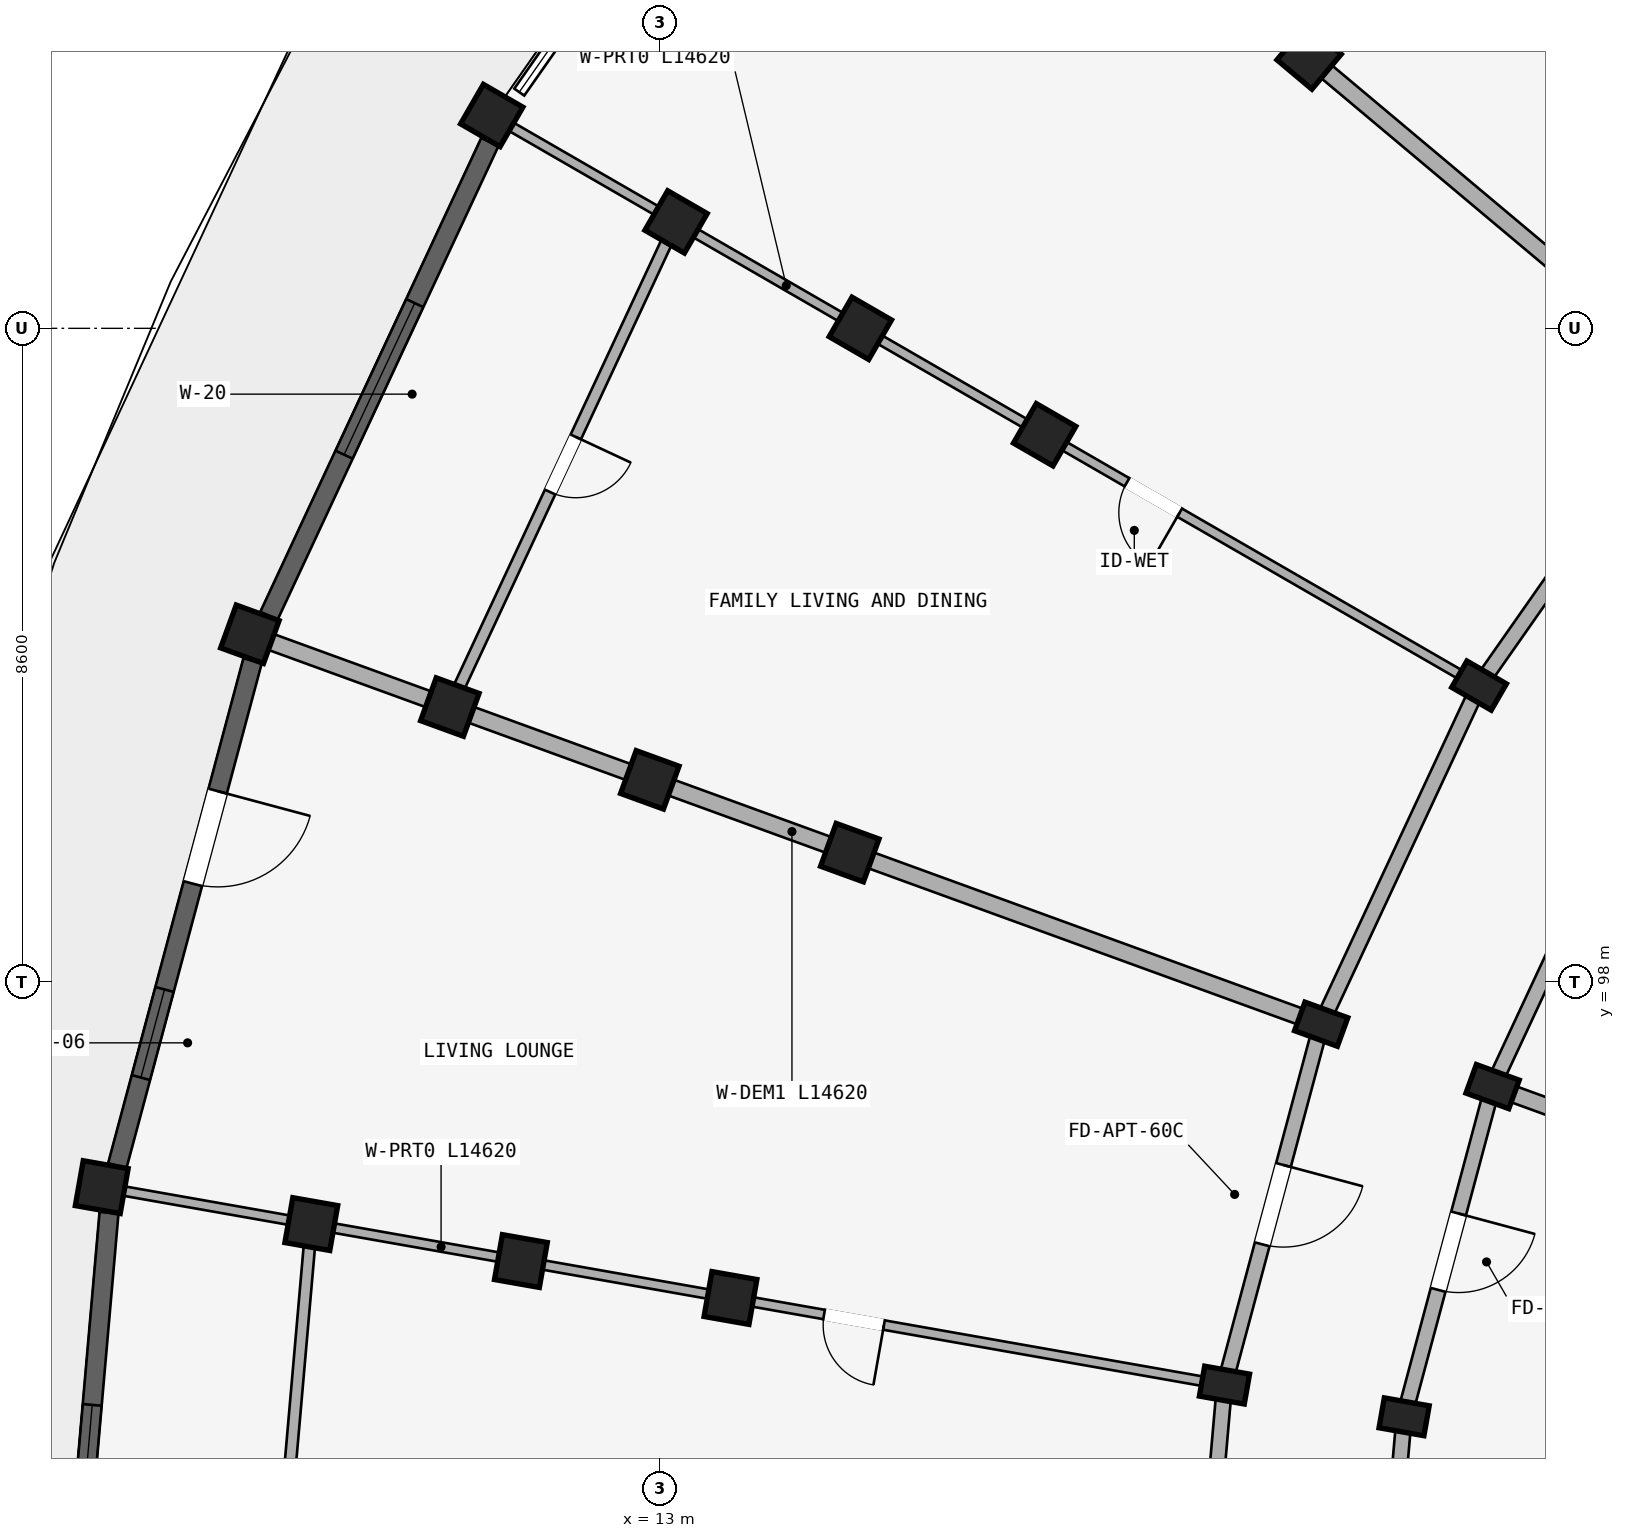
"""IFC4 building model, lengths in metres.
Left out: names, types, materials, properties, quantities, classifications, styles, units other than length and angle.
Written with IfcOpenShell. Run it as: python <this file> out.ifc"""

import sys

from ifc_helpers import new_model, si_unit, direction, frame, frame_2d, origin, origin_2d, place, context, subcontext, project, spatial, rectangle, extrude, element, fill, save


model = new_model("IFC4")
c1 = context("Model", 3, precision=1e-05, world=origin(), true_north=direction((0.0, 1.0)))
c2 = subcontext(c1, "Body", "Model", "MODEL_VIEW")
j1 = project(units=[si_unit("LENGTHUNIT", "METRE"), si_unit("PLANEANGLEUNIT", "RADIAN")], contexts=[c1])
p1 = place(None, origin())
s1 = spatial("IfcSite", under=j1, at=p1, CompositionType="ELEMENT")
p2 = place(p1, origin())
s2 = spatial("IfcBuilding", under=s1, at=p2, CompositionType="ELEMENT")
p3 = place(p2, frame((0.0, 0.0, 40.2)))
s3 = spatial("IfcBuildingStorey", under=s2, at=p3, CompositionType="ELEMENT", Elevation=40.2)
p4 = place(p3, frame((21.542, 110.169, 0.0), z_axis=(0.0, 0.0, 1.0), x_axis=(0.642787609687, 0.766044443119, 0.0)))
e1 = element("IfcColumn", 1, at=p4, inside=s3, PredefinedType="COLUMN", context=c2, shape_type="SweptSolid", body=[
    extrude(rectangle(XDim=0.6, YDim=0.6, at=origin_2d()), origin(), (0.0, 0.0, 1.0), 2.93),
])
p5 = place(p3, frame((23.778, 101.9, 0.0), z_axis=(0.0, 0.0, 1.0), x_axis=(0.5, 0.866025403784, 0.0)))
e2 = element("IfcColumn", 2, at=p5, inside=s3, PredefinedType="COLUMN", context=c2, shape_type="SweptSolid", body=[
    extrude(rectangle(XDim=0.4, YDim=0.6, at=origin_2d()), origin(), (0.0, 0.0, 1.0), 2.93),
])
for number, where, z_axis, x_axis in (
    (3, (18.062, 105.2, 0.0), (0.0, 0.0, 1.0), (0.5, 0.866, 0.0)),
    (4, (15.637, 106.6, 0.0), (0.0, 0.0, 1.0), (0.5, 0.866, 0.0)),
    (5, (13.213, 108.0, 0.0), (0.0, 0.0, 1.0), (0.5, 0.866, 0.0)),
):
    element("IfcColumn", number, at=place(p3, frame(where, z_axis=z_axis, x_axis=x_axis)), inside=s3, PredefinedType="COLUMN", context=c2, shape_type="SweptSolid", body=[
        extrude(rectangle(XDim=0.6, YDim=0.6, at=origin_2d()), origin(), (0.0, 0.0, 1.0), 2.93),
    ])
p6 = place(p3, frame((10.788, 109.4, 0.0), z_axis=(0.0, 0.0, 1.0), x_axis=(0.5, 0.866025403784, 0.0)))
e6 = element("IfcColumn", 6, at=p6, inside=s3, PredefinedType="COLUMN", context=c2, shape_type="SweptSolid", body=[
    extrude(rectangle(XDim=0.6, YDim=0.6, at=origin_2d()), origin(), (0.0, 0.0, 1.0), 2.97),
])
for number, where, z_axis, x_axis in (
    (7, (23.956, 96.624, 0.0), (0.0, 0.0, 1.0), (0.342, 0.94, 0.0)),
    (8, (21.701, 97.445, 0.0), (0.0, 0.0, 1.0), (0.342, 0.94, 0.0)),
):
    element("IfcColumn", number, at=place(p3, frame(where, z_axis=z_axis, x_axis=x_axis)), inside=s3, PredefinedType="COLUMN", context=c2, shape_type="SweptSolid", body=[
        extrude(rectangle(XDim=0.4, YDim=0.6, at=origin_2d()), origin(), (0.0, 0.0, 1.0), 2.93),
    ])
for number, where, z_axis, x_axis in (
    (9, (15.499, 99.702, 0.0), (0.0, 0.0, 1.0), (0.342, 0.94, 0.0)),
    (10, (12.868, 100.66, 0.0), (0.0, 0.0, 1.0), (0.342, 0.94, 0.0)),
    (11, (10.236, 101.618, 0.0), (0.0, 0.0, 1.0), (0.342, 0.94, 0.0)),
):
    element("IfcColumn", number, at=place(p3, frame(where, z_axis=z_axis, x_axis=x_axis)), inside=s3, PredefinedType="COLUMN", context=c2, shape_type="SweptSolid", body=[
        extrude(rectangle(XDim=0.6, YDim=0.6, at=origin_2d()), origin(), (0.0, 0.0, 1.0), 2.93),
    ])
p7 = place(p3, frame((7.605, 102.575, 0.0), z_axis=(0.0, 0.0, 1.0), x_axis=(0.342020143326, 0.939692620786, 0.0)))
e12 = element("IfcColumn", 12, at=p7, inside=s3, PredefinedType="COLUMN", context=c2, shape_type="SweptSolid", body=[
    extrude(rectangle(XDim=0.6, YDim=0.6, at=origin_2d()), origin(), (0.0, 0.0, 1.0), 2.97),
])
for number, where, z_axis, x_axis in (
    (13, (22.792, 92.28, 0.0), (0.0, 0.0, 1.0), (0.174, 0.985, 0.0)),
    (14, (20.428, 92.697, 0.0), (0.0, 0.0, 1.0), (0.174, 0.985, 0.0)),
):
    element("IfcColumn", number, at=place(p3, frame(where, z_axis=z_axis, x_axis=x_axis)), inside=s3, PredefinedType="COLUMN", context=c2, shape_type="SweptSolid", body=[
        extrude(rectangle(XDim=0.4, YDim=0.6, at=origin_2d()), origin(), (0.0, 0.0, 1.0), 2.93),
    ])
for number, where, z_axis, x_axis in (
    (15, (13.929, 93.843, 0.0), (0.0, 0.0, 1.0), (0.174, 0.985, 0.0)),
    (16, (11.171, 94.329, 0.0), (0.0, 0.0, 1.0), (0.174, 0.985, 0.0)),
    (17, (8.414, 94.815, 0.0), (0.0, 0.0, 1.0), (0.174, 0.985, 0.0)),
):
    element("IfcColumn", number, at=place(p3, frame(where, z_axis=z_axis, x_axis=x_axis)), inside=s3, PredefinedType="COLUMN", context=c2, shape_type="SweptSolid", body=[
        extrude(rectangle(XDim=0.6, YDim=0.6, at=origin_2d()), origin(), (0.0, 0.0, 1.0), 2.93),
    ])
p8 = place(p3, frame((5.656, 95.302, 0.0), z_axis=(0.0, 0.0, 1.0), x_axis=(0.173648177667, 0.984807753012, 0.0)))
e18 = element("IfcColumn", 18, at=p8, inside=s3, PredefinedType="COLUMN", context=c2, shape_type="SweptSolid", body=[
    extrude(rectangle(XDim=0.6, YDim=0.6, at=origin_2d()), origin(), (0.0, 0.0, 1.0), 2.97),
])
p9 = place(p3, frame((26.598, 105.927, 0.0), z_axis=(0.0, 0.0, 1.0), x_axis=(-0.573592335331, -0.819140911474, 0.0)))
e19 = element("IfcWall", 19, at=p9, inside=s3, PredefinedType="STANDARD", context=c2, shape_type="SweptSolid", body=[
    extrude(rectangle(XDim=4.916, YDim=0.2, at=frame_2d((2.458, 0.0))), origin(), (0.0, 0.0, 1.0), 2.372),
])
p10 = place(p9, frame((1.938, 0.0, 0.0)))
e20 = element("IfcOpeningElement", 20, at=p10, cuts=e19, PredefinedType="OPENING", context=c2, shape_type="SweptSolid", body=[
    extrude(rectangle(XDim=1.04, YDim=2.15, at=frame_2d((0.52, 1.075))), frame((0.0, 0.11, 0.0), z_axis=(0.0, -1.0, 0.0), x_axis=(1.0, 0.0, 0.0)), (0.0, 0.0, 1.0), 0.22),
])
p11 = place(p3, frame((25.856, 100.7, 0.0), z_axis=(0.0, 0.0, 1.0), x_axis=(-0.422617978463, -0.906307919131, 0.0)))
e21 = element("IfcWall", 21, at=p11, inside=s3, PredefinedType="STANDARD", context=c2, shape_type="SweptSolid", body=[
    extrude(rectangle(XDim=4.497, YDim=0.2, at=frame_2d((2.249, 0.0))), origin(), (0.0, 0.0, 1.0), 2.372),
])
p12 = place(p3, frame((23.778, 101.9, 0.0), z_axis=(0.0, 0.0, 1.0), x_axis=(-0.422629854778, -0.906302381024, 0.0)))
e22 = element("IfcWall", 22, at=p12, inside=s3, PredefinedType="STANDARD", context=c2, shape_type="SweptSolid", body=[
    extrude(rectangle(XDim=4.915, YDim=0.2, at=frame_2d((2.458, 0.0))), origin(), (0.0, 0.0, 1.0), 2.372),
])
p13 = place(p3, frame((23.956, 96.624, 0.0), z_axis=(0.0, 0.0, 1.0), x_axis=(-0.258787642463, -0.965934240054, 0.0)))
e23 = element("IfcWall", 23, at=p13, inside=s3, PredefinedType="STANDARD", context=c2, shape_type="SweptSolid", body=[
    extrude(rectangle(XDim=4.497, YDim=0.2, at=frame_2d((2.249, 0.0))), origin(), (0.0, 0.0, 1.0), 2.372),
])
p14 = place(p13, frame((1.729, 0.0, 0.0)))
e24 = element("IfcOpeningElement", 24, at=p14, cuts=e23, PredefinedType="OPENING", context=c2, shape_type="SweptSolid", body=[
    extrude(rectangle(XDim=1.04, YDim=2.15, at=frame_2d((0.52, 1.075))), frame((0.0, 0.11, 0.0), z_axis=(0.0, -1.0, 0.0), x_axis=(1.0, 0.0, 0.0)), (0.0, 0.0, 1.0), 0.22),
])
p15 = place(p3, frame((21.701, 97.445, 0.0), z_axis=(0.0, 0.0, 1.0), x_axis=(-0.258803112091, -0.965930095386, 0.0)))
e25 = element("IfcWall", 25, at=p15, inside=s3, PredefinedType="STANDARD", context=c2, shape_type="SweptSolid", body=[
    extrude(rectangle(XDim=4.916, YDim=0.2, at=frame_2d((2.458, 0.0))), origin(), (0.0, 0.0, 1.0), 2.372),
])
p16 = place(p15, frame((1.918, 0.0, 0.0)))
e26 = element("IfcOpeningElement", 26, at=p16, cuts=e25, PredefinedType="OPENING", context=c2, shape_type="SweptSolid", body=[
    extrude(rectangle(XDim=1.08, YDim=2.15, at=frame_2d((0.54, 1.075))), frame((0.0, 0.11, 0.0), z_axis=(0.0, -1.0, 0.0), x_axis=(1.0, 0.0, 0.0)), (0.0, 0.0, 1.0), 0.22),
])
p17 = place(p3, frame((22.792, 92.28, 0.0), z_axis=(0.0, 0.0, 1.0), x_axis=(-0.087187153726, -0.996191949488, 0.0)))
e27 = element("IfcWall", 27, at=p17, inside=s3, PredefinedType="STANDARD", context=c2, shape_type="SweptSolid", body=[
    extrude(rectangle(XDim=4.497, YDim=0.2, at=frame_2d((2.249, 0.0))), origin(), (0.0, 0.0, 1.0), 2.372),
])
p18 = place(p3, frame((20.428, 92.697, 0.0), z_axis=(0.0, 0.0, 1.0), x_axis=(-0.087167566415, -0.996193663584, 0.0)))
e28 = element("IfcWall", 28, at=p18, inside=s3, PredefinedType="STANDARD", context=c2, shape_type="SweptSolid", body=[
    extrude(rectangle(XDim=4.916, YDim=0.2, at=frame_2d((2.458, 0.0))), origin(), (0.0, 0.0, 1.0), 2.372),
])
p19 = place(p3, frame((30.009, 109.479, 0.0), z_axis=(0.0, 0.0, 1.0), x_axis=(-0.642779216656, 0.76605148563, 0.0)))
e29 = element("IfcWall", 29, at=p19, inside=s3, PredefinedType="PARTITIONING", context=c2, shape_type="SweptSolid", body=[
    extrude(rectangle(XDim=14.62, YDim=0.125, at=frame_2d((7.31, 0.0))), origin(), (0.0, 0.0, 1.0), 2.372),
])
p20 = place(p19, frame((4.449, 0.0, 0.0)))
e30 = element("IfcOpeningElement", 30, at=p20, cuts=e29, PredefinedType="OPENING", context=c2, shape_type="SweptSolid", body=[
    extrude(rectangle(XDim=0.8, YDim=2.1, at=frame_2d((0.4, 1.05))), frame((0.0, 0.073, 0.0), z_axis=(0.0, -1.0, 0.0), x_axis=(1.0, 0.0, 0.0)), (0.0, 0.0, 1.0), 0.145),
])
p21 = place(p3, frame((26.521, 105.991, 0.0), z_axis=(0.0, 0.0, 1.0), x_axis=(-0.76605148563, 0.642779216656, 0.0)))
e31 = element("IfcWall", 31, at=p21, inside=s3, PredefinedType="STANDARD", context=c2, shape_type="SweptSolid", body=[
    extrude(rectangle(XDim=14.62, YDim=0.22, at=frame_2d((7.31, 0.0))), origin(), (0.0, 0.0, 1.0), 2.372),
])
p22 = place(p3, frame((23.691, 101.95, 0.0), z_axis=(0.0, 0.0, 1.0), x_axis=(-0.866020956416, 0.500007702989, 0.0)))
e32 = element("IfcWall", 32, at=p22, inside=s3, PredefinedType="PARTITIONING", context=c2, shape_type="SweptSolid", body=[
    extrude(rectangle(XDim=14.62, YDim=0.125, at=frame_2d((7.31, 0.0))), origin(), (0.0, 0.0, 1.0), 2.372),
])
p23 = place(p22, frame((4.449, 0.0, 0.0)))
e33 = element("IfcOpeningElement", 33, at=p23, cuts=e32, PredefinedType="OPENING", context=c2, shape_type="SweptSolid", body=[
    extrude(rectangle(XDim=0.8, YDim=2.1, at=frame_2d((0.4, 1.05))), frame((0.0, 0.073, 0.0), z_axis=(0.0, -1.0, 0.0), x_axis=(1.0, 0.0, 0.0)), (0.0, 0.0, 1.0), 0.145),
])
p24 = place(p3, frame((30.346, 94.298, 0.0), z_axis=(0.0, 0.0, 1.0), x_axis=(-0.939696231917, 0.342010221662, 0.0)))
e34 = element("IfcWall", 34, at=p24, inside=s3, PredefinedType="STANDARD", context=c2, shape_type="SweptSolid", body=[
    extrude(rectangle(XDim=6.75, YDim=0.22, at=frame_2d((3.375, 0.0))), origin(), (0.0, 0.0, 1.0), 2.372),
])
p25 = place(p3, frame((21.607, 97.479, 0.0), z_axis=(0.0, 0.0, 1.0), x_axis=(-0.939694408106, 0.342015232663, 0.0)))
e35 = element("IfcWall", 35, at=p25, inside=s3, PredefinedType="STANDARD", context=c2, shape_type="SweptSolid", body=[
    extrude(rectangle(XDim=14.62, YDim=0.22, at=frame_2d((7.31, 0.0))), origin(), (0.0, 0.0, 1.0), 2.372),
])
p26 = place(p3, frame((20.33, 92.714, 0.0), z_axis=(0.0, 0.0, 1.0), x_axis=(-0.984809269474, 0.173639577162, 0.0)))
e36 = element("IfcWall", 36, at=p26, inside=s3, PredefinedType="PARTITIONING", context=c2, shape_type="SweptSolid", body=[
    extrude(rectangle(XDim=14.62, YDim=0.125, at=frame_2d((7.31, 0.0))), origin(), (0.0, 0.0, 1.0), 2.372),
])
p27 = place(p26, frame((4.449, 0.0, 0.0)))
e37 = element("IfcOpeningElement", 37, at=p27, cuts=e36, PredefinedType="OPENING", context=c2, shape_type="SweptSolid", body=[
    extrude(rectangle(XDim=0.8, YDim=2.1, at=frame_2d((0.4, 1.05))), frame((0.0, 0.073, 0.0), z_axis=(0.0, -1.0, 0.0), x_axis=(1.0, 0.0, 0.0)), (0.0, 0.0, 1.0), 0.145),
])
p28 = place(p3, frame((13.213, 108.0, 0.0), z_axis=(0.0, 0.0, 1.0), x_axis=(-0.422640621205, -0.906297360311, 0.0)))
e38 = element("IfcWall", 38, at=p28, inside=s3, PredefinedType="PLUMBINGWALL", context=c2, shape_type="SweptSolid", body=[
    extrude(rectangle(XDim=7.042, YDim=0.15, at=frame_2d((3.521, 0.0))), origin(), (0.0, 0.0, 1.0), 2.372),
])
p29 = place(p28, frame((3.121, 0.0, 0.0)))
e39 = element("IfcOpeningElement", 39, at=p29, cuts=e38, PredefinedType="OPENING", context=c2, shape_type="SweptSolid", body=[
    extrude(rectangle(XDim=0.8, YDim=2.1, at=frame_2d((0.4, 1.05))), frame((0.0, 0.085, 0.0), z_axis=(0.0, -1.0, 0.0), x_axis=(1.0, 0.0, 0.0)), (0.0, 0.0, 1.0), 0.17),
])
p30 = place(p3, frame((8.414, 94.815, 0.0), z_axis=(0.0, 0.0, 1.0), x_axis=(-0.087156198737, -0.996194658198, 0.0)))
e40 = element("IfcWall", 40, at=p30, inside=s3, PredefinedType="PLUMBINGWALL", context=c2, shape_type="SweptSolid", body=[
    extrude(rectangle(XDim=7.042, YDim=0.15, at=frame_2d((3.521, 0.0))), origin(), (0.0, 0.0, 1.0), 2.372),
])
p31 = place(p30, frame((3.141, 0.0, 0.0)))
e41 = element("IfcOpeningElement", 41, at=p31, cuts=e40, PredefinedType="OPENING", context=c2, shape_type="SweptSolid", body=[
    extrude(rectangle(XDim=0.76, YDim=2.05, at=frame_2d((0.38, 1.025))), frame((0.0, 0.085, 0.0), z_axis=(0.0, -1.0, 0.0), x_axis=(1.0, 0.0, 0.0)), (0.0, 0.0, 1.0), 0.17),
])
p32 = place(p3, frame((10.763, 109.052, 0.0), z_axis=(0.0, 0.0, 1.0), x_axis=(-0.422628979279, -0.906302789289, 0.0)))
e42 = element("IfcWall", 42, at=p32, inside=s3, PredefinedType="STANDARD", context=c2, shape_type="SweptSolid", body=[
    extrude(rectangle(XDim=6.879, YDim=0.25, at=frame_2d((3.439, 0.0))), origin(), (0.0, 0.0, 1.0), 2.48),
])
p33 = place(p32, frame((2.34, 0.0, 0.38)))
e43 = element("IfcOpeningElement", 43, at=p33, cuts=e42, PredefinedType="OPENING", context=c2, shape_type="SweptSolid", body=[
    extrude(rectangle(XDim=2.2, YDim=1.9, at=frame_2d((1.1, 0.95))), frame((0.0, 0.135, 0.0), z_axis=(0.0, -1.0, 0.0), x_axis=(1.0, 0.0, 0.0)), (0.0, 0.0, 1.0), 0.27),
])
p34 = place(p3, frame((7.642, 102.228, 0.0), z_axis=(0.0, 0.0, 1.0), x_axis=(-0.258835428922, -0.965921436109, 0.0)))
e44 = element("IfcWall", 44, at=p34, inside=s3, PredefinedType="STANDARD", context=c2, shape_type="SweptSolid", body=[
    extrude(rectangle(XDim=6.879, YDim=0.25, at=frame_2d((3.439, 0.0))), origin(), (0.0, 0.0, 1.0), 2.48),
])
p35 = place(p34, frame((4.479, 0.0, 0.53)))
e45 = element("IfcOpeningElement", 45, at=p35, cuts=e44, PredefinedType="OPENING", context=c2, shape_type="SweptSolid", body=[
    extrude(rectangle(XDim=1.2, YDim=1.5, at=frame_2d((0.6, 0.75))), frame((0.0, 0.135, 0.0), z_axis=(0.0, -1.0, 0.0), x_axis=(1.0, 0.0, 0.0)), (0.0, 0.0, 1.0), 0.27),
])
p36 = place(p34, frame((1.778, 0.0, 0.0)))
e46 = element("IfcOpeningElement", 46, at=p36, cuts=e44, PredefinedType="OPENING", context=c2, shape_type="SweptSolid", body=[
    extrude(rectangle(XDim=1.26, YDim=2.15, at=frame_2d((0.63, 1.075))), frame((0.0, 0.135, 0.0), z_axis=(0.0, -1.0, 0.0), x_axis=(1.0, 0.0, 0.0)), (0.0, 0.0, 1.0), 0.27),
])
p37 = place(p3, frame((5.752, 94.966, 0.0), z_axis=(0.0, 0.0, 1.0), x_axis=(-0.087165629485, -0.996193833065, 0.0)))
e47 = element("IfcWall", 47, at=p37, inside=s3, PredefinedType="STANDARD", context=c2, shape_type="SweptSolid", body=[
    extrude(rectangle(XDim=6.879, YDim=0.25, at=frame_2d((3.439, 0.0))), origin(), (0.0, 0.0, 1.0), 2.48),
])
p38 = place(p37, frame((2.54, 0.0, 0.63)))
e48 = element("IfcOpeningElement", 48, at=p38, cuts=e47, PredefinedType="OPENING", context=c2, shape_type="SweptSolid", body=[
    extrude(rectangle(XDim=1.8, YDim=1.65, at=frame_2d((0.9, 0.825))), frame((0.0, 0.135, 0.0), z_axis=(0.0, -1.0, 0.0), x_axis=(1.0, 0.0, 0.0)), (0.0, 0.0, 1.0), 0.27),
])
p39 = place(p33, origin())
e49 = element("IfcWindow", 49, at=p39, inside=s3, PartitioningType="TRIPLE_PANEL_VERTICAL", PredefinedType="WINDOW", context=c2, shape_type="SweptSolid", body=[
    extrude(rectangle(XDim=2.2, YDim=1.9, at=frame_2d((1.1, 0.95))), frame((0.0, 0.03, 0.0), z_axis=(0.0, -1.0, 0.0), x_axis=(1.0, 0.0, 0.0)), (0.0, 0.0, 1.0), 0.06),
])
fill(e43, e49)
p40 = place(p35, origin())
e50 = element("IfcWindow", 50, at=p40, inside=s3, PartitioningType="SINGLE_PANEL", PredefinedType="WINDOW", context=c2, shape_type="SweptSolid", body=[
    extrude(rectangle(XDim=1.2, YDim=1.5, at=frame_2d((0.6, 0.75))), frame((0.0, 0.03, 0.0), z_axis=(0.0, -1.0, 0.0), x_axis=(1.0, 0.0, 0.0)), (0.0, 0.0, 1.0), 0.06),
])
fill(e45, e50)
p41 = place(p38, origin())
e51 = element("IfcWindow", 51, at=p41, inside=s3, PartitioningType="DOUBLE_PANEL_VERTICAL", PredefinedType="WINDOW", context=c2, shape_type="SweptSolid", body=[
    extrude(rectangle(XDim=1.8, YDim=1.65, at=frame_2d((0.9, 0.825))), frame((0.0, 0.03, 0.0), z_axis=(0.0, -1.0, 0.0), x_axis=(1.0, 0.0, 0.0)), (0.0, 0.0, 1.0), 0.06),
])
fill(e48, e51)
p42 = place(p23, frame((0.8, 0.0, 0.0), z_axis=(0.0, 0.0, 1.0), x_axis=(-1.0, 0.0, 0.0)))
e52 = element("IfcDoor", 52, at=p42, inside=s3, OperationType="SINGLE_SWING_RIGHT", PredefinedType="DOOR", context=c2, shape_type="SweptSolid", body=[
    extrude(rectangle(XDim=0.8, YDim=2.1, at=frame_2d((0.4, 1.05))), frame((0.0, 0.025, 0.0), z_axis=(0.0, -1.0, 0.0), x_axis=(1.0, 0.0, 0.0)), (0.0, 0.0, 1.0), 0.05),
])
fill(e33, e52)
p43 = place(p27, origin())
e53 = element("IfcDoor", 53, at=p43, inside=s3, OperationType="SINGLE_SWING_LEFT", PredefinedType="DOOR", context=c2, shape_type="SweptSolid", body=[
    extrude(rectangle(XDim=0.8, YDim=2.1, at=frame_2d((0.4, 1.05))), frame((0.0, 0.025, 0.0), z_axis=(0.0, -1.0, 0.0), x_axis=(1.0, 0.0, 0.0)), (0.0, 0.0, 1.0), 0.05),
])
fill(e37, e53)
p44 = place(p29, frame((0.8, 0.0, 0.0), z_axis=(0.0, 0.0, 1.0), x_axis=(-1.0, 0.0, 0.0)))
e54 = element("IfcDoor", 54, at=p44, inside=s3, OperationType="SINGLE_SWING_RIGHT", PredefinedType="DOOR", context=c2, shape_type="SweptSolid", body=[
    extrude(rectangle(XDim=0.8, YDim=2.1, at=frame_2d((0.4, 1.05))), frame((0.0, 0.025, 0.0), z_axis=(0.0, -1.0, 0.0), x_axis=(1.0, 0.0, 0.0)), (0.0, 0.0, 1.0), 0.05),
])
fill(e39, e54)
p45 = place(p16, origin())
e55 = element("IfcDoor", 55, at=p45, inside=s3, OperationType="SINGLE_SWING_LEFT", PredefinedType="DOOR", context=c2, shape_type="SweptSolid", body=[
    extrude(rectangle(XDim=1.08, YDim=2.15, at=frame_2d((0.54, 1.075))), frame((0.0, 0.025, 0.0), z_axis=(0.0, -1.0, 0.0), x_axis=(1.0, 0.0, 0.0)), (0.0, 0.0, 1.0), 0.05),
])
fill(e26, e55)
p46 = place(p14, frame((1.04, 0.0, 0.0), z_axis=(0.0, 0.0, 1.0), x_axis=(-1.0, 0.0, 0.0)))
e56 = element("IfcDoor", 56, at=p46, inside=s3, OperationType="SINGLE_SWING_RIGHT", PredefinedType="DOOR", context=c2, shape_type="SweptSolid", body=[
    extrude(rectangle(XDim=1.04, YDim=2.15, at=frame_2d((0.52, 1.075))), frame((0.0, 0.025, 0.0), z_axis=(0.0, -1.0, 0.0), x_axis=(1.0, 0.0, 0.0)), (0.0, 0.0, 1.0), 0.05),
])
fill(e24, e56)
p47 = place(p36, frame((1.26, 0.0, 0.0), z_axis=(0.0, 0.0, 1.0), x_axis=(-1.0, 0.0, 0.0)))
e57 = element("IfcDoor", 57, at=p47, inside=s3, OperationType="SINGLE_SWING_RIGHT", PredefinedType="DOOR", context=c2, shape_type="SweptSolid", body=[
    extrude(rectangle(XDim=1.26, YDim=2.15, at=frame_2d((0.63, 1.075))), frame((0.0, 0.025, 0.0), z_axis=(0.0, -1.0, 0.0), x_axis=(1.0, 0.0, 0.0)), (0.0, 0.0, 1.0), 0.05),
])
fill(e46, e57)
save(model, sys.argv[1])
